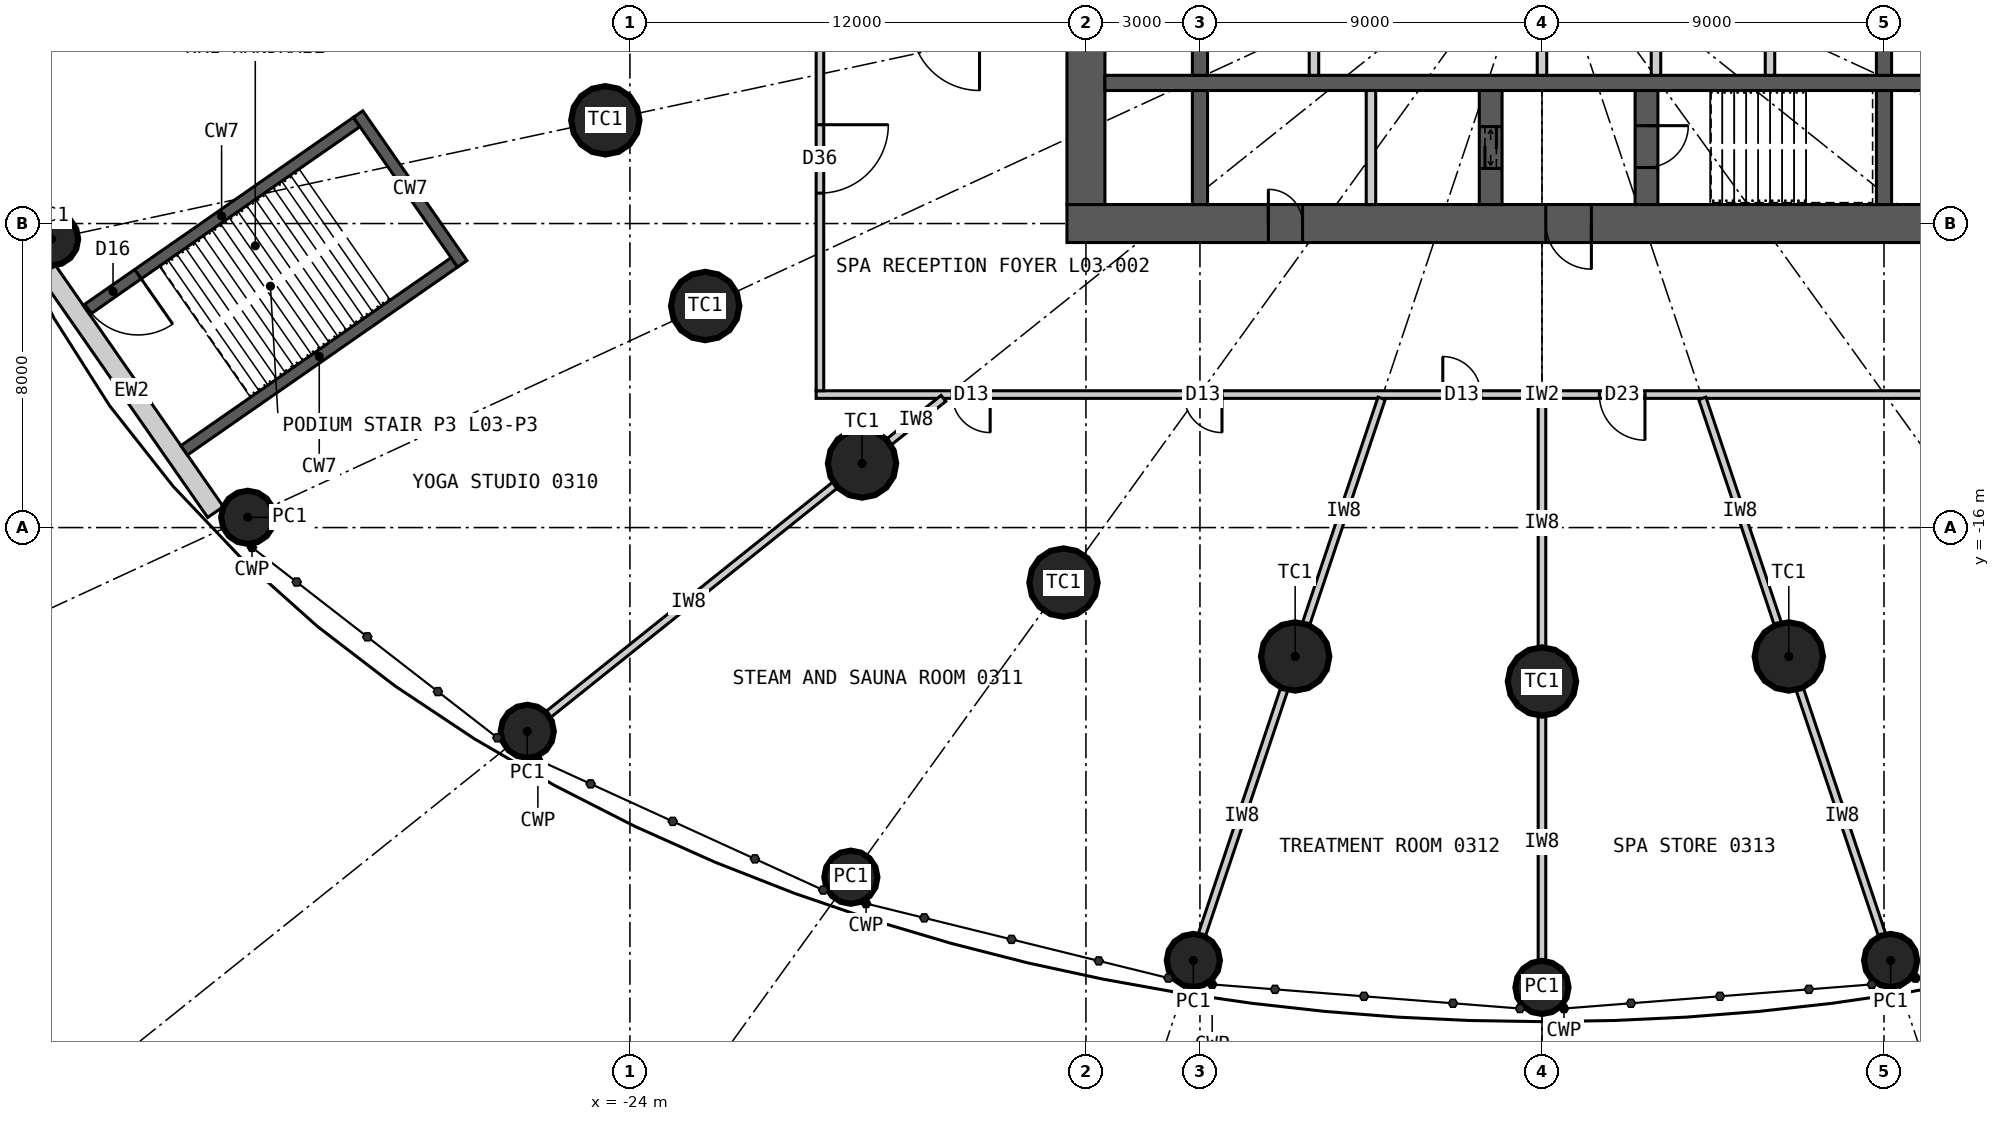
"""IFC4 building model, lengths in metres.
Left out: names, types, materials, properties, quantities, classifications, styles, units other than length and angle.
Written with IfcOpenShell. Run it as: python <this file> out.ifc"""

import sys

from ifc_helpers import new_model, si_unit, direction, frame, frame_2d, origin, origin_2d, place, context, subcontext, project, spatial, rectangle, circle, extrude, element, fill, save


model = new_model("IFC4")
c1 = context("Model", 3, precision=1e-05, world=origin(), true_north=direction((0.0, 1.0)))
c2 = subcontext(c1, "Body", "Model", "MODEL_VIEW")
j1 = project(units=[si_unit("LENGTHUNIT", "METRE"), si_unit("PLANEANGLEUNIT", "RADIAN")], contexts=[c1])
p1 = place(None, origin())
s1 = spatial("IfcSite", under=j1, at=p1, CompositionType="ELEMENT")
p2 = place(p1, origin())
s2 = spatial("IfcBuilding", under=s1, at=p2, CompositionType="ELEMENT")
p3 = place(p2, frame((0.0, 0.0, 19.2)))
s3 = spatial("IfcBuildingStorey", under=s2, at=p3, CompositionType="ELEMENT", Elevation=19.2)
for number, where, z_axis, x_axis in (
    (1, (-24.647, -5.283, 0.0), (0.0, 0.0, 1.0), (1.0, 0.0, 0.0)),
    (2, (-22.019, -10.17, 0.0), (0.0, 0.0, 1.0), (1.0, 0.0, 0.0)),
    (3, (-17.892, -14.313, 0.0), (0.0, 0.0, 1.0), (1.0, 0.0, 0.0)),
    (4, (-12.591, -17.447, 0.0), (0.0, 0.0, 1.0), (1.0, 0.0, 0.0)),
    (5, (-6.495, -19.391, 0.0), (0.0, 0.0, 1.0), (1.0, 0.0, 0.0)),
    (6, (0.0, -20.05, 0.0), (0.0, 0.0, 1.0), (1.0, 0.0, 0.0)),
    (7, (6.495, -19.391, 0.0), (0.0, 0.0, 1.0), (1.0, 0.0, 0.0)),
):
    element("IfcColumn", number, at=place(p3, frame(where, z_axis=z_axis, x_axis=x_axis)), inside=s3, PredefinedType="COLUMN", context=c2, shape_type="SweptSolid", body=[
        extrude(circle(Radius=0.9, at=origin_2d()), origin(), (0.0, 0.0, 1.0), 5.4),
    ])
for number, where, z_axis, x_axis in (
    (8, (-39.218, -8.407, 0.0), (0.0, 0.0, 1.0), (1.0, 0.0, 0.0)),
    (9, (-34.057, -15.73, 0.0), (0.0, 0.0, 1.0), (1.0, 0.0, 0.0)),
    (10, (-26.702, -21.362, 0.0), (0.0, 0.0, 1.0), (1.0, 0.0, 0.0)),
    (11, (-18.186, -25.199, 0.0), (0.0, 0.0, 1.0), (1.0, 0.0, 0.0)),
    (12, (-9.174, -27.391, 0.0), (0.0, 0.0, 1.0), (1.0, 0.0, 0.0)),
    (13, (0.0, -28.1, 0.0), (0.0, 0.0, 1.0), (1.0, 0.0, 0.0)),
    (14, (9.174, -27.391, 0.0), (0.0, 0.0, 1.0), (1.0, 0.0, 0.0)),
):
    element("IfcColumn", number, at=place(p3, frame(where, z_axis=z_axis, x_axis=x_axis)), inside=s3, PredefinedType="COLUMN", context=c2, shape_type="SweptSolid", body=[
        extrude(circle(Radius=0.7, at=origin_2d()), origin(), (0.0, 0.0, 1.0), 5.4),
    ])
p4 = place(p3, frame((12.5, -8.0, 0.0), z_axis=(0.0, 0.0, 1.0), x_axis=(-1.0, 0.0, 0.0)))
e15 = element("IfcWall", 15, at=p4, inside=s3, PredefinedType="SHEAR", context=c2, shape_type="SweptSolid", body=[
    extrude(rectangle(XDim=25.0, YDim=1.0, at=frame_2d((12.5, 0.0))), origin(), (0.0, 0.0, 1.0), 5.4),
])
p5 = place(p4, frame((11.2, 0.0, 0.0)))
e16 = element("IfcOpeningElement", 16, at=p5, cuts=e15, PredefinedType="OPENING", context=c2, shape_type="SweptSolid", body=[
    extrude(rectangle(XDim=1.2, YDim=2.2, at=frame_2d((0.6, 1.1))), frame((0.0, 0.51, 0.0), z_axis=(0.0, -1.0, 0.0), x_axis=(1.0, 0.0, 0.0)), (0.0, 0.0, 1.0), 1.02),
])
p6 = place(p4, frame((18.8, 0.0, 0.0)))
e17 = element("IfcOpeningElement", 17, at=p6, cuts=e15, PredefinedType="OPENING", context=c2, shape_type="SweptSolid", body=[
    extrude(rectangle(XDim=0.9, YDim=2.2, at=frame_2d((0.45, 1.1))), frame((0.0, 0.51, 0.0), z_axis=(0.0, -1.0, 0.0), x_axis=(1.0, 0.0, 0.0)), (0.0, 0.0, 1.0), 1.02),
])
p7 = place(p3, frame((-12.0, 7.5, 0.0), z_axis=(0.0, 0.0, 1.0), x_axis=(0.0, -1.0, 0.0)))
e18 = element("IfcWall", 18, at=p7, inside=s3, PredefinedType="SHEAR", context=c2, shape_type="SweptSolid", body=[
    extrude(rectangle(XDim=15.0, YDim=1.0, at=frame_2d((7.5, 0.0))), origin(), (0.0, 0.0, 1.0), 5.4),
])
p8 = place(p7, frame((6.6, 0.0, 0.0)))
e19 = element("IfcOpeningElement", 19, at=p8, cuts=e18, PredefinedType="OPENING", context=c2, shape_type="SweptSolid", body=[
    extrude(rectangle(XDim=1.8, YDim=2.2, at=frame_2d((0.9, 1.1))), frame((0.0, 0.51, 0.0), z_axis=(0.0, -1.0, 0.0), x_axis=(1.0, 0.0, 0.0)), (0.0, 0.0, 1.0), 1.02),
])
p9 = place(p3, frame((-11.5, -4.3, 0.0), z_axis=(0.0, 0.0, 1.0), x_axis=(1.0, 0.0, 0.0)))
e20 = element("IfcWall", 20, at=p9, inside=s3, PredefinedType="SHEAR", context=c2, shape_type="SweptSolid", body=[
    extrude(rectangle(XDim=23.0, YDim=0.4, at=frame_2d((11.5, 0.0))), origin(), (0.0, 0.0, 1.0), 5.4),
])
p10 = place(p3, frame((-9.0, -4.1, 0.0), z_axis=(0.0, 0.0, 1.0), x_axis=(0.0, 1.0, 0.0)))
e21 = element("IfcWall", 21, at=p10, inside=s3, PredefinedType="SHEAR", context=c2, shape_type="SweptSolid", body=[
    extrude(rectangle(XDim=2.35, YDim=0.4, at=frame_2d((1.175, 0.0))), origin(), (0.0, 0.0, 1.0), 5.4),
])
p11 = place(p3, frame((-9.0, -7.5, 0.0), z_axis=(0.0, 0.0, 1.0), x_axis=(0.0, 1.0, 0.0)))
e22 = element("IfcWall", 22, at=p11, inside=s3, PredefinedType="SHEAR", context=c2, shape_type="SweptSolid", body=[
    extrude(rectangle(XDim=3.0, YDim=0.4, at=frame_2d((1.5, 0.0))), origin(), (0.0, 0.0, 1.0), 5.4),
])
p12 = place(p3, frame((9.0, -4.1, 0.0), z_axis=(0.0, 0.0, 1.0), x_axis=(0.0, 1.0, 0.0)))
e23 = element("IfcWall", 23, at=p12, inside=s3, PredefinedType="SHEAR", context=c2, shape_type="SweptSolid", body=[
    extrude(rectangle(XDim=2.35, YDim=0.4, at=frame_2d((1.175, 0.0))), origin(), (0.0, 0.0, 1.0), 5.4),
])
p13 = place(p3, frame((9.0, -7.5, 0.0), z_axis=(0.0, 0.0, 1.0), x_axis=(0.0, 1.0, 0.0)))
e24 = element("IfcWall", 24, at=p13, inside=s3, PredefinedType="SHEAR", context=c2, shape_type="SweptSolid", body=[
    extrude(rectangle(XDim=3.0, YDim=0.4, at=frame_2d((1.5, 0.0))), origin(), (0.0, 0.0, 1.0), 5.4),
])
p14 = place(p3, frame((2.75, -7.5, 0.0), z_axis=(0.0, 0.0, 1.0), x_axis=(0.0, 1.0, 0.0)))
e25 = element("IfcWall", 25, at=p14, inside=s3, PredefinedType="SHEAR", context=c2, shape_type="SweptSolid", body=[
    extrude(rectangle(XDim=3.0, YDim=0.6, at=frame_2d((1.5, 0.0))), origin(), (0.0, 0.0, 1.0), 5.4),
])
p15 = place(p14, frame((0.975, 0.0, 0.0)))
e26 = element("IfcOpeningElement", 26, at=p15, cuts=e25, PredefinedType="OPENING", context=c2, shape_type="SweptSolid", body=[
    extrude(rectangle(XDim=1.1, YDim=2.2, at=frame_2d((0.55, 1.1))), frame((0.0, 0.31, 0.0), z_axis=(0.0, -1.0, 0.0), x_axis=(1.0, 0.0, 0.0)), (0.0, 0.0, 1.0), 0.62),
])
p16 = place(p3, frame((-1.35, -7.5, 0.0), z_axis=(0.0, 0.0, 1.0), x_axis=(0.0, 1.0, 0.0)))
e27 = element("IfcWall", 27, at=p16, inside=s3, PredefinedType="SHEAR", context=c2, shape_type="SweptSolid", body=[
    extrude(rectangle(XDim=3.0, YDim=0.6, at=frame_2d((1.5, 0.0))), origin(), (0.0, 0.0, 1.0), 5.4),
])
p17 = place(p16, frame((0.95, 0.0, 0.0)))
e28 = element("IfcOpeningElement", 28, at=p17, cuts=e27, PredefinedType="OPENING", context=c2, shape_type="SweptSolid", body=[
    extrude(rectangle(XDim=1.1, YDim=2.2, at=frame_2d((0.55, 1.1))), frame((0.0, 0.31, 0.0), z_axis=(0.0, -1.0, 0.0), x_axis=(1.0, 0.0, 0.0)), (0.0, 0.0, 1.0), 0.62),
])
p18 = place(p3, frame((-4.5, -7.5, 0.0), z_axis=(0.0, 0.0, 1.0), x_axis=(0.0, 1.0, 0.0)))
e29 = element("IfcWall", 29, at=p18, inside=s3, PredefinedType="PARTITIONING", context=c2, shape_type="SweptSolid", body=[
    extrude(rectangle(XDim=3.0, YDim=0.25, at=frame_2d((1.5, 0.0))), origin(), (0.0, 0.0, 1.0), 5.4),
])
for number, where, z_axis, x_axis in (
    (30, (-6.0, -4.1, 0.0), (0.0, 0.0, 1.0), (0.0, 1.0, 0.0)),
    (31, (0.0, -4.1, 0.0), (0.0, 0.0, 1.0), (0.0, 1.0, 0.0)),
    (32, (3.0, -4.1, 0.0), (0.0, 0.0, 1.0), (0.0, 1.0, 0.0)),
    (33, (6.0, -4.1, 0.0), (0.0, 0.0, 1.0), (0.0, 1.0, 0.0)),
):
    element("IfcWall", number, at=place(p3, frame(where, z_axis=z_axis, x_axis=x_axis)), inside=s3, PredefinedType="PARTITIONING", context=c2, shape_type="SweptSolid", body=[
        extrude(rectangle(XDim=2.35, YDim=0.25, at=frame_2d((1.175, 0.0))), origin(), (0.0, 0.0, 1.0), 5.4),
    ])
p19 = place(p3, frame((-39.32, -9.244, 0.0), z_axis=(0.0, 0.0, 1.0), x_axis=(0.571029335057, -0.820929655028, 0.0)))
e34 = element("IfcWall", 34, at=p19, inside=s3, PredefinedType="SOLIDWALL", context=c2, shape_type="SweptSolid", body=[
    extrude(rectangle(XDim=7.733, YDim=0.5, at=frame_2d((3.866, 0.0))), origin(), (0.0, 0.0, 1.0), 5.15),
])
p20 = place(p3, frame((19.1, -12.5, 0.0), z_axis=(0.0, 0.0, 1.0), x_axis=(-1.0, 0.0, 0.0)))
e35 = element("IfcWall", 35, at=p20, inside=s3, PredefinedType="PARTITIONING", context=c2, shape_type="SweptSolid", body=[
    extrude(rectangle(XDim=38.2, YDim=0.2, at=frame_2d((19.1, 0.0))), origin(), (0.0, 0.0, 1.0), 5.15),
])
p21 = place(p20, frame((6.54, 0.0, 0.0)))
e36 = element("IfcOpeningElement", 36, at=p21, cuts=e35, PredefinedType="OPENING", context=c2, shape_type="SweptSolid", body=[
    extrude(rectangle(XDim=1.8, YDim=2.4, at=frame_2d((0.9, 1.2))), frame((0.0, 0.11, 0.0), z_axis=(0.0, -1.0, 0.0), x_axis=(1.0, 0.0, 0.0)), (0.0, 0.0, 1.0), 0.22),
])
p22 = place(p20, frame((27.52, 0.0, 0.0)))
e37 = element("IfcOpeningElement", 37, at=p22, cuts=e35, PredefinedType="OPENING", context=c2, shape_type="SweptSolid", body=[
    extrude(rectangle(XDim=1.0, YDim=2.2, at=frame_2d((0.5, 1.1))), frame((0.0, 0.11, 0.0), z_axis=(0.0, -1.0, 0.0), x_axis=(1.0, 0.0, 0.0)), (0.0, 0.0, 1.0), 0.22),
])
p23 = place(p20, frame((20.71, 0.0, 0.0)))
e38 = element("IfcOpeningElement", 38, at=p23, cuts=e35, PredefinedType="OPENING", context=c2, shape_type="SweptSolid", body=[
    extrude(rectangle(XDim=1.0, YDim=2.2, at=frame_2d((0.5, 1.1))), frame((0.0, 0.11, 0.0), z_axis=(0.0, -1.0, 0.0), x_axis=(1.0, 0.0, 0.0)), (0.0, 0.0, 1.0), 0.22),
])
p24 = place(p20, frame((16.39, 0.0, 0.0)))
e39 = element("IfcOpeningElement", 39, at=p24, cuts=e35, PredefinedType="OPENING", context=c2, shape_type="SweptSolid", body=[
    extrude(rectangle(XDim=1.2, YDim=2.2, at=frame_2d((0.6, 1.1))), frame((0.0, 0.11, 0.0), z_axis=(0.0, -1.0, 0.0), x_axis=(1.0, 0.0, 0.0)), (0.0, 0.0, 1.0), 0.22),
])
p25 = place(p20, frame((33.62, 0.0, 0.0)))
e40 = element("IfcOpeningElement", 40, at=p25, cuts=e35, PredefinedType="OPENING", context=c2, shape_type="SweptSolid", body=[
    extrude(rectangle(XDim=1.0, YDim=2.2, at=frame_2d((0.5, 1.1))), frame((0.0, 0.11, 0.0), z_axis=(0.0, -1.0, 0.0), x_axis=(1.0, 0.0, 0.0)), (0.0, 0.0, 1.0), 0.22),
])
p26 = place(p3, frame((-19.0, 12.4, 0.0), z_axis=(0.0, 0.0, 1.0), x_axis=(0.0, -1.0, 0.0)))
e41 = element("IfcWall", 41, at=p26, inside=s3, PredefinedType="PARTITIONING", context=c2, shape_type="SweptSolid", body=[
    extrude(rectangle(XDim=24.8, YDim=0.2, at=frame_2d((12.4, 0.0))), origin(), (0.0, 0.0, 1.0), 5.15),
])
p27 = place(p26, frame((5.2, 0.0, 0.0)))
e42 = element("IfcOpeningElement", 42, at=p27, cuts=e41, PredefinedType="OPENING", context=c2, shape_type="SweptSolid", body=[
    extrude(rectangle(XDim=1.8, YDim=2.4, at=frame_2d((0.9, 1.2))), frame((0.0, 0.11, 0.0), z_axis=(0.0, -1.0, 0.0), x_axis=(1.0, 0.0, 0.0)), (0.0, 0.0, 1.0), 0.22),
])
p28 = place(p26, frame((17.8, 0.0, 0.0)))
e43 = element("IfcOpeningElement", 43, at=p28, cuts=e41, PredefinedType="OPENING", context=c2, shape_type="SweptSolid", body=[
    extrude(rectangle(XDim=1.8, YDim=2.4, at=frame_2d((0.9, 1.2))), frame((0.0, 0.11, 0.0), z_axis=(0.0, -1.0, 0.0), x_axis=(1.0, 0.0, 0.0)), (0.0, 0.0, 1.0), 0.22),
])
p29 = place(p3, frame((-15.75, -12.6, 0.0), z_axis=(0.0, 0.0, 1.0), x_axis=(-0.780881734892, -0.6246788904, 0.0)))
e44 = element("IfcWall", 44, at=p29, inside=s3, PredefinedType="PARTITIONING", context=c2, shape_type="SweptSolid", body=[
    extrude(rectangle(XDim=1.843, YDim=0.2, at=frame_2d((0.921, 0.0))), origin(), (0.0, 0.0, 1.0), 4.3),
])
p30 = place(p3, frame((-18.594, -14.875, 0.0), z_axis=(0.0, 0.0, 1.0), x_axis=(-0.780868809443, -0.624695047554, 0.0)))
e45 = element("IfcWall", 45, at=p30, inside=s3, PredefinedType="PARTITIONING", context=c2, shape_type="SweptSolid", body=[
    extrude(rectangle(XDim=9.883, YDim=0.2, at=frame_2d((4.941, 0.0))), origin(), (0.0, 0.0, 1.0), 4.25),
])
p31 = place(p3, frame((-4.22, -12.6, 0.0), z_axis=(0.0, 0.0, 1.0), x_axis=(-0.317584173452, -0.9482300843, 0.0)))
e46 = element("IfcWall", 46, at=p31, inside=s3, PredefinedType="PARTITIONING", context=c2, shape_type="SweptSolid", body=[
    extrude(rectangle(XDim=6.262, YDim=0.2, at=frame_2d((3.131, 0.0))), origin(), (0.0, 0.0, 1.0), 4.3),
])
p32 = place(p3, frame((-6.781, -20.245, 0.0), z_axis=(0.0, 0.0, 1.0), x_axis=(-0.317580622989, -0.948231273425, 0.0)))
e47 = element("IfcWall", 47, at=p32, inside=s3, PredefinedType="PARTITIONING", context=c2, shape_type="SweptSolid", body=[
    extrude(rectangle(XDim=7.036, YDim=0.2, at=frame_2d((3.518, 0.0))), origin(), (0.0, 0.0, 1.0), 4.25),
])
p33 = place(p3, frame((0.0, -12.6, 0.0), z_axis=(0.0, 0.0, 1.0), x_axis=(0.0, -1.0, 0.0)))
e48 = element("IfcWall", 48, at=p33, inside=s3, PredefinedType="PARTITIONING", context=c2, shape_type="SweptSolid", body=[
    extrude(rectangle(XDim=6.55, YDim=0.2, at=frame_2d((3.275, 0.0))), origin(), (0.0, 0.0, 1.0), 4.3),
])
p34 = place(p3, frame((0.0, -20.95, 0.0), z_axis=(0.0, 0.0, 1.0), x_axis=(0.0, -1.0, 0.0)))
e49 = element("IfcWall", 49, at=p34, inside=s3, PredefinedType="PARTITIONING", context=c2, shape_type="SweptSolid", body=[
    extrude(rectangle(XDim=6.65, YDim=0.2, at=frame_2d((3.325, 0.0))), origin(), (0.0, 0.0, 1.0), 4.25),
])
p35 = place(p3, frame((4.22, -12.6, 0.0), z_axis=(0.0, 0.0, 1.0), x_axis=(0.317584173452, -0.9482300843, 0.0)))
e50 = element("IfcWall", 50, at=p35, inside=s3, PredefinedType="PARTITIONING", context=c2, shape_type="SweptSolid", body=[
    extrude(rectangle(XDim=6.262, YDim=0.2, at=frame_2d((3.131, 0.0))), origin(), (0.0, 0.0, 1.0), 4.3),
])
p36 = place(p3, frame((6.781, -20.245, 0.0), z_axis=(0.0, 0.0, 1.0), x_axis=(0.317580622989, -0.948231273425, 0.0)))
e51 = element("IfcWall", 51, at=p36, inside=s3, PredefinedType="PARTITIONING", context=c2, shape_type="SweptSolid", body=[
    extrude(rectangle(XDim=7.036, YDim=0.2, at=frame_2d((3.518, 0.0))), origin(), (0.0, 0.0, 1.0), 4.25),
])
p37 = place(p3, frame((-38.299, -10.274, 0.0), z_axis=(0.0, 0.0, 1.0), x_axis=(0.820936803751, 0.571019057692, 0.0)))
e52 = element("IfcWall", 52, at=p37, inside=s3, PredefinedType="SHEAR", context=c2, shape_type="SweptSolid", body=[
    extrude(rectangle(XDim=8.66, YDim=0.3, at=frame_2d((4.33, 0.0))), origin(), (0.0, 0.0, 1.0), 5.4),
])
p38 = place(p37, frame((0.05, 0.0, 0.0)))
e53 = element("IfcOpeningElement", 53, at=p38, cuts=e52, PredefinedType="OPENING", context=c2, shape_type="SweptSolid", body=[
    extrude(rectangle(XDim=1.6, YDim=2.1, at=frame_2d((0.8, 1.05))), frame((0.0, 0.16, 0.0), z_axis=(0.0, -1.0, 0.0), x_axis=(1.0, 0.0, 0.0)), (0.0, 0.0, 1.0), 0.32),
])
p39 = place(p3, frame((-35.729, -13.968, 0.0), z_axis=(0.0, 0.0, 1.0), x_axis=(0.82092761123, 0.571032273274, 0.0)))
e54 = element("IfcWall", 54, at=p39, inside=s3, PredefinedType="SHEAR", context=c2, shape_type="SweptSolid", body=[
    extrude(rectangle(XDim=8.66, YDim=0.3, at=frame_2d((4.33, 0.0))), origin(), (0.0, 0.0, 1.0), 5.4),
])
p40 = place(p3, frame((-31.153, -5.12, 0.0), z_axis=(0.0, 0.0, 1.0), x_axis=(0.571036173178, -0.820924898467, 0.0)))
e55 = element("IfcWall", 55, at=p40, inside=s3, PredefinedType="SHEAR", context=c2, shape_type="SweptSolid", body=[
    extrude(rectangle(XDim=4.8, YDim=0.3, at=frame_2d((2.4, 0.0))), origin(), (0.0, 0.0, 1.0), 5.4),
])
p41 = place(p38, origin())
e56 = element("IfcDoor", 56, at=p41, inside=s3, OperationType="SINGLE_SWING_RIGHT", PredefinedType="DOOR", context=c2, shape_type="SweptSolid", body=[
    extrude(rectangle(XDim=1.6, YDim=2.1, at=frame_2d((0.8, 1.05))), frame((0.0, 0.025, 0.0), z_axis=(0.0, -1.0, 0.0), x_axis=(1.0, 0.0, 0.0)), (0.0, 0.0, 1.0), 0.05),
])
fill(e53, e56)
p42 = place(p28, origin())
e57 = element("IfcDoor", 57, at=p42, inside=s3, OperationType="DOUBLE_DOOR_DOUBLE_SWING", PredefinedType="DOOR", context=c2, shape_type="SweptSolid", body=[
    extrude(rectangle(XDim=1.8, YDim=2.4, at=frame_2d((0.9, 1.2))), frame((0.0, 0.025, 0.0), z_axis=(0.0, -1.0, 0.0), x_axis=(1.0, 0.0, 0.0)), (0.0, 0.0, 1.0), 0.05),
])
fill(e43, e57)
p43 = place(p22, origin())
e58 = element("IfcDoor", 58, at=p43, inside=s3, OperationType="SINGLE_SWING_LEFT", PredefinedType="DOOR", context=c2, shape_type="SweptSolid", body=[
    extrude(rectangle(XDim=1.0, YDim=2.2, at=frame_2d((0.5, 1.1))), frame((0.0, 0.025, 0.0), z_axis=(0.0, -1.0, 0.0), x_axis=(1.0, 0.0, 0.0)), (0.0, 0.0, 1.0), 0.05),
])
fill(e37, e58)
p44 = place(p23, origin())
e59 = element("IfcDoor", 59, at=p44, inside=s3, OperationType="SINGLE_SWING_RIGHT", PredefinedType="DOOR", context=c2, shape_type="SweptSolid", body=[
    extrude(rectangle(XDim=1.0, YDim=2.2, at=frame_2d((0.5, 1.1))), frame((0.0, 0.025, 0.0), z_axis=(0.0, -1.0, 0.0), x_axis=(1.0, 0.0, 0.0)), (0.0, 0.0, 1.0), 0.05),
])
fill(e38, e59)
p45 = place(p24, origin())
e60 = element("IfcDoor", 60, at=p45, inside=s3, OperationType="SINGLE_SWING_LEFT", PredefinedType="DOOR", context=c2, shape_type="SweptSolid", body=[
    extrude(rectangle(XDim=1.2, YDim=2.2, at=frame_2d((0.6, 1.1))), frame((0.0, 0.025, 0.0), z_axis=(0.0, -1.0, 0.0), x_axis=(1.0, 0.0, 0.0)), (0.0, 0.0, 1.0), 0.05),
])
fill(e39, e60)
p46 = place(p5, origin())
e61 = element("IfcDoor", 61, at=p46, inside=s3, OperationType="SINGLE_SWING_LEFT", PredefinedType="DOOR", context=c2, shape_type="SweptSolid", body=[
    extrude(rectangle(XDim=1.2, YDim=2.2, at=frame_2d((0.6, 1.1))), frame((0.0, 0.025, 0.0), z_axis=(0.0, -1.0, 0.0), x_axis=(1.0, 0.0, 0.0)), (0.0, 0.0, 1.0), 0.05),
])
fill(e16, e61)
p47 = place(p15, origin())
e62 = element("IfcDoor", 62, at=p47, inside=s3, OperationType="SINGLE_SWING_RIGHT", PredefinedType="DOOR", context=c2, shape_type="SweptSolid", body=[
    extrude(rectangle(XDim=1.1, YDim=2.2, at=frame_2d((0.55, 1.1))), frame((0.0, 0.025, 0.0), z_axis=(0.0, -1.0, 0.0), x_axis=(1.0, 0.0, 0.0)), (0.0, 0.0, 1.0), 0.05),
])
fill(e26, e62)
p48 = place(p17, origin())
e63 = element("IfcDoor", 63, at=p48, inside=s3, OperationType="DOUBLE_DOOR_SLIDING", PredefinedType="DOOR", context=c2, shape_type="SweptSolid", body=[
    extrude(rectangle(XDim=1.1, YDim=2.2, at=frame_2d((0.55, 1.1))), frame((0.0, 0.025, 0.0), z_axis=(0.0, -1.0, 0.0), x_axis=(1.0, 0.0, 0.0)), (0.0, 0.0, 1.0), 0.05),
])
fill(e28, e63)
p49 = place(p6, origin())
e64 = element("IfcDoor", 64, at=p49, inside=s3, OperationType="SINGLE_SWING_RIGHT", PredefinedType="DOOR", context=c2, shape_type="SweptSolid", body=[
    extrude(rectangle(XDim=0.9, YDim=2.2, at=frame_2d((0.45, 1.1))), frame((0.0, 0.025, 0.0), z_axis=(0.0, -1.0, 0.0), x_axis=(1.0, 0.0, 0.0)), (0.0, 0.0, 1.0), 0.05),
])
fill(e17, e64)
p50 = place(p25, origin())
e65 = element("IfcDoor", 65, at=p50, inside=s3, OperationType="SINGLE_SWING_LEFT", PredefinedType="DOOR", context=c2, shape_type="SweptSolid", body=[
    extrude(rectangle(XDim=1.0, YDim=2.2, at=frame_2d((0.5, 1.1))), frame((0.0, 0.025, 0.0), z_axis=(0.0, -1.0, 0.0), x_axis=(1.0, 0.0, 0.0)), (0.0, 0.0, 1.0), 0.05),
])
fill(e40, e65)
save(model, sys.argv[1])
